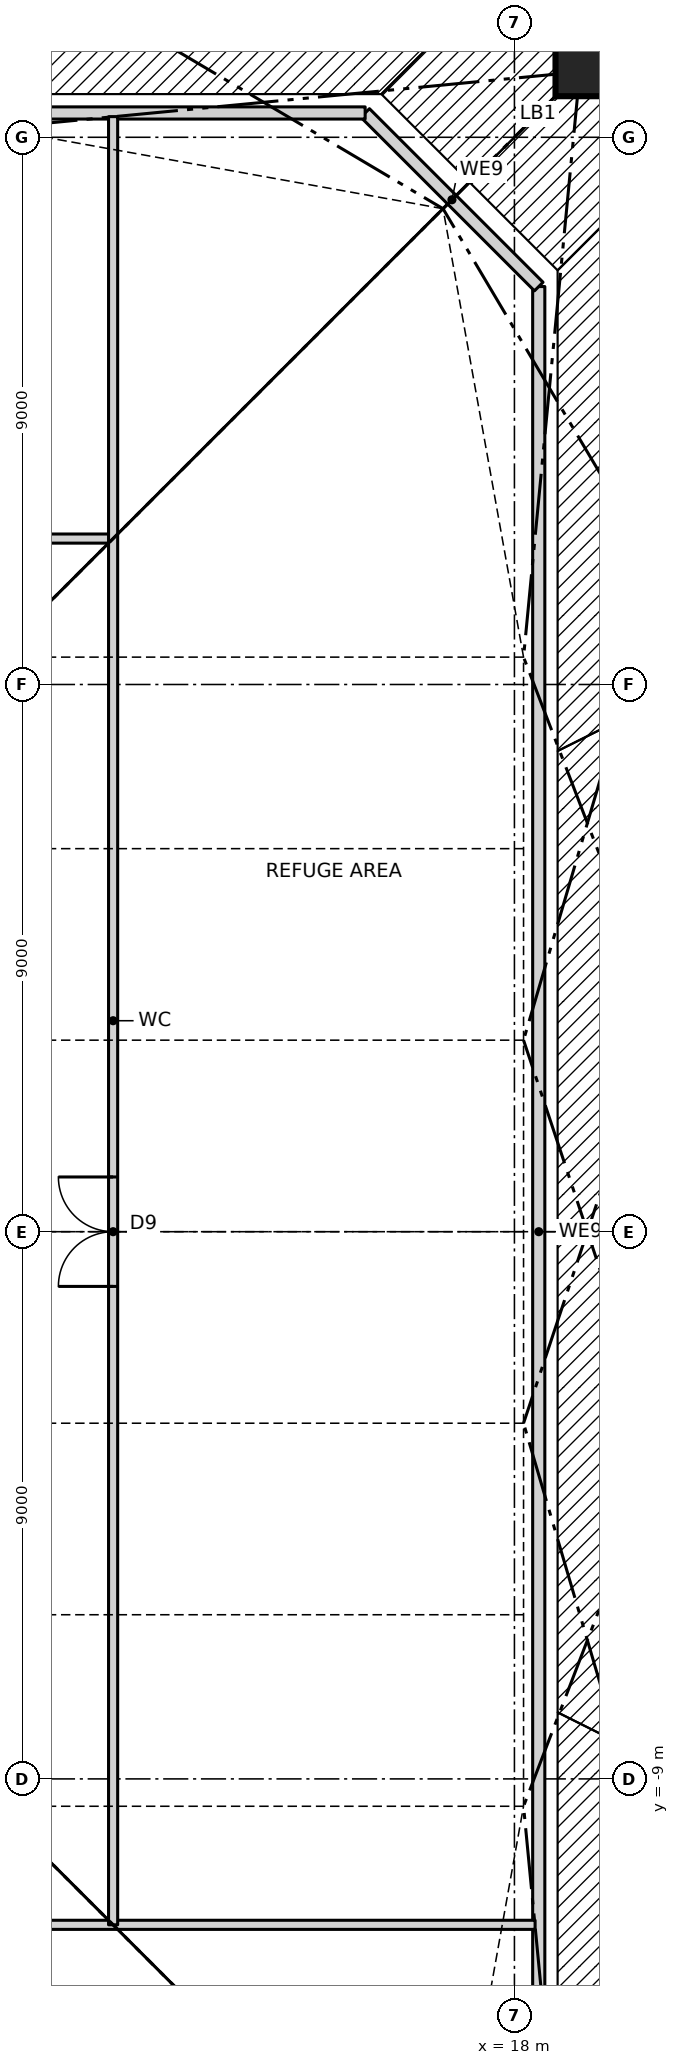
"""IFC4 building model, lengths in metres.
Left out: names, types, materials, properties, quantities, classifications, styles, units other than length and angle.
Written with IfcOpenShell. Run it as: python <this file> out.ifc"""

import sys

from ifc_helpers import new_model, si_unit, direction, frame, frame_2d, origin, origin_2d, place, context, subcontext, project, spatial, rectangle, hollow_rectangle, extrude, clip, halfspace, element, fill, save


model = new_model("IFC4")
c1 = context("Model", 3, precision=1e-05, world=origin(), true_north=direction((0.0, 1.0)))
c2 = subcontext(c1, "Body", "Model", "MODEL_VIEW")
j1 = project(units=[si_unit("LENGTHUNIT", "METRE"), si_unit("PLANEANGLEUNIT", "RADIAN")], contexts=[c1])
p1 = place(None, origin())
s1 = spatial("IfcSite", under=j1, at=p1, CompositionType="ELEMENT")
p2 = place(p1, origin())
s2 = spatial("IfcBuilding", under=s1, at=p2, CompositionType="ELEMENT")
p3 = place(p2, frame((0.0, 0.0, 143.5)))
s3 = spatial("IfcBuildingStorey", under=s2, at=p3, CompositionType="ELEMENT", Elevation=143.5)
p4 = place(p3, frame((20.4, -10.8, 0.0), z_axis=(-0.343580475001, 0.206163197348, 0.916214600002), x_axis=(-0.514523120505, -0.857476506072, 0.0)))
e1 = element("IfcColumn", 1, at=p4, inside=s3, PredefinedType="COLUMN", context=c2, shape_type="Clipping", body=[
    clip(clip(extrude(hollow_rectangle(XDim=0.8, YDim=0.8, WallThickness=0.07, at=origin_2d()), origin(), (0.0, 0.0, 1.0), 6.549), halfspace(frame((0.0, 0.0, 0.0), z_axis=(0.0, -0.400687916891, -0.916214600002), x_axis=(-0.514523120505, 0.785632494022, -0.343580475001)), False)), halfspace(frame((0.0, 2.404, 5.497), z_axis=(0.0, 0.400687916891, 0.916214600002), x_axis=(-0.514523120505, 0.785632494022, -0.343580475001)), False)),
])
p5 = place(p3, frame((20.4, -3.6, 0.0), z_axis=(-0.350260100688, 0.07008242466, 0.934026935168), x_axis=(-0.196197979098, -0.980564303347, 0.0)))
e2 = element("IfcColumn", 2, at=p5, inside=s3, PredefinedType="COLUMN", context=c2, shape_type="Clipping", body=[
    clip(clip(extrude(hollow_rectangle(XDim=0.8, YDim=0.8, WallThickness=0.07, at=origin_2d()), origin(), (0.0, 0.0, 1.0), 6.424), halfspace(frame((0.0, 0.0, 0.0), z_axis=(0.0, -0.35720258171, -0.934026935168), x_axis=(-0.196197979098, 0.91587347099, -0.350260100688)), False)), halfspace(frame((0.0, 2.143, 5.604), z_axis=(0.0, 0.35720258171, 0.934026935168), x_axis=(-0.196197979098, 0.91587347099, -0.350260100688)), False)),
])
p6 = place(p3, frame((20.4, 3.6, 0.0), z_axis=(-0.350260100688, -0.07008242466, 0.934026935168), x_axis=(0.196197979098, -0.980564303347, 0.0)))
e3 = element("IfcColumn", 3, at=p6, inside=s3, PredefinedType="COLUMN", context=c2, shape_type="Clipping", body=[
    clip(clip(extrude(hollow_rectangle(XDim=0.8, YDim=0.8, WallThickness=0.07, at=origin_2d()), origin(), (0.0, 0.0, 1.0), 6.424), halfspace(frame((0.0, 0.0, 0.0), z_axis=(0.0, -0.35720258171, -0.934026935168), x_axis=(0.196197979098, 0.91587347099, -0.350260100688)), False)), halfspace(frame((0.0, 2.143, 5.604), z_axis=(0.0, 0.35720258171, 0.934026935168), x_axis=(0.196197979098, 0.91587347099, -0.350260100688)), False)),
])
p7 = place(p3, frame((20.4, 10.8, 0.0), z_axis=(-0.343580475001, -0.206163197348, 0.916214600002), x_axis=(0.514523120505, -0.857476506072, 0.0)))
e4 = element("IfcColumn", 4, at=p7, inside=s3, PredefinedType="COLUMN", context=c2, shape_type="Clipping", body=[
    clip(clip(extrude(hollow_rectangle(XDim=0.8, YDim=0.8, WallThickness=0.07, at=origin_2d()), origin(), (0.0, 0.0, 1.0), 6.549), halfspace(frame((0.0, 0.0, 0.0), z_axis=(0.0, -0.400687916891, -0.916214600002), x_axis=(0.514523120505, 0.785632494022, -0.343580475001)), False)), halfspace(frame((0.0, 2.404, 5.497), z_axis=(0.0, 0.400687916891, 0.916214600002), x_axis=(0.514523120505, 0.785632494022, -0.343580475001)), False)),
])
p8 = place(p3, frame((19.076, 19.076, 0.0), z_axis=(-0.331294578225, -0.331294578225, 0.883452208599), x_axis=(0.707106781187, -0.707106781187, 0.0)))
e5 = element("IfcColumn", 5, at=p8, inside=s3, PredefinedType="COLUMN", context=c2, shape_type="Clipping", body=[
    clip(clip(extrude(hollow_rectangle(XDim=0.8, YDim=0.8, WallThickness=0.18, at=origin_2d()), origin(), (0.0, 0.0, 1.0), 6.792), halfspace(frame((0.0, 0.0, 0.0), z_axis=(0.0, -0.468521285666, -0.883452208599), x_axis=(0.707106781187, 0.624695047554, -0.331294578225)), False)), halfspace(frame((0.0, 2.811, 5.301), z_axis=(0.0, 0.468521285666, 0.883452208599), x_axis=(0.707106781187, 0.624695047554, -0.331294578225)), False)),
])
p9 = place(p3, frame((10.8, 20.4, 0.0), z_axis=(-0.206163197348, -0.343580475001, 0.916214600002), x_axis=(0.857476506072, -0.514523120505, 0.0)))
e6 = element("IfcColumn", 6, at=p9, inside=s3, PredefinedType="COLUMN", context=c2, shape_type="Clipping", body=[
    clip(clip(extrude(hollow_rectangle(XDim=0.8, YDim=0.8, WallThickness=0.07, at=origin_2d()), origin(), (0.0, 0.0, 1.0), 6.549), halfspace(frame((0.0, 0.0, 0.0), z_axis=(0.0, -0.400687916891, -0.916214600002), x_axis=(0.857476506072, 0.471413595046, -0.206163197348)), False)), halfspace(frame((0.0, 2.404, 5.497), z_axis=(0.0, 0.400687916891, 0.916214600002), x_axis=(0.857476506072, 0.471413595046, -0.206163197348)), False)),
])
p10 = place(p3, frame((18.4, -15.545, 0.0), z_axis=(0.0, 0.0, 1.0), x_axis=(0.0, 1.0, 0.0)))
e7 = element("IfcWall", 7, at=p10, inside=s3, PredefinedType="PARTITIONING", context=c2, shape_type="SweptSolid", body=[
    extrude(rectangle(XDim=31.09, YDim=0.2, at=frame_2d((15.545, 0.0))), origin(), (0.0, 0.0, 1.0), 5.7),
])
p11 = place(p3, frame((18.4, 15.545, 0.0), z_axis=(0.0, 0.0, 1.0), x_axis=(-0.707106781187, 0.707106781187, 0.0)))
e8 = element("IfcWall", 8, at=p11, inside=s3, PredefinedType="PARTITIONING", context=c2, shape_type="SweptSolid", body=[
    extrude(rectangle(XDim=4.038, YDim=0.2, at=frame_2d((2.019, 0.0))), origin(), (0.0, 0.0, 1.0), 5.7),
])
p12 = place(p3, frame((15.545, 18.4, 0.0), z_axis=(0.0, 0.0, 1.0), x_axis=(-1.0, 0.0, 0.0)))
e9 = element("IfcWall", 9, at=p12, inside=s3, PredefinedType="PARTITIONING", context=c2, shape_type="SweptSolid", body=[
    extrude(rectangle(XDim=31.09, YDim=0.2, at=frame_2d((15.545, 0.0))), origin(), (0.0, 0.0, 1.0), 5.7),
])
p13 = place(p3, frame((-11.4, -11.4, 0.0), z_axis=(0.0, 0.0, 1.0), x_axis=(1.0, 0.0, 0.0)))
e10 = element("IfcWall", 10, at=p13, inside=s3, PredefinedType="PARTITIONING", context=c2, shape_type="SweptSolid", body=[
    extrude(rectangle(XDim=29.74, YDim=0.15, at=frame_2d((14.87, 0.0))), origin(), (0.0, 0.0, 1.0), 5.77),
])
p14 = place(p13, frame((4.1, 0.0, 0.0)))
e11 = element("IfcOpeningElement", 11, at=p14, cuts=e10, PredefinedType="OPENING", context=c2, shape_type="SweptSolid", body=[
    extrude(rectangle(XDim=1.8, YDim=2.1, at=frame_2d((0.9, 1.05))), frame((0.0, 0.085, 0.0), z_axis=(0.0, -1.0, 0.0), x_axis=(1.0, 0.0, 0.0)), (0.0, 0.0, 1.0), 0.17),
])
p15 = place(p13, frame((12.6, 0.0, 0.0)))
e12 = element("IfcOpeningElement", 12, at=p15, cuts=e10, PredefinedType="OPENING", context=c2, shape_type="SweptSolid", body=[
    extrude(rectangle(XDim=1.8, YDim=2.1, at=frame_2d((0.9, 1.05))), frame((0.0, 0.085, 0.0), z_axis=(0.0, -1.0, 0.0), x_axis=(1.0, 0.0, 0.0)), (0.0, 0.0, 1.0), 0.17),
])
p16 = place(p13, frame((19.0, 0.0, 0.0)))
e13 = element("IfcOpeningElement", 13, at=p16, cuts=e10, PredefinedType="OPENING", context=c2, shape_type="SweptSolid", body=[
    extrude(rectangle(XDim=1.8, YDim=2.1, at=frame_2d((0.9, 1.05))), frame((0.0, 0.085, 0.0), z_axis=(0.0, -1.0, 0.0), x_axis=(1.0, 0.0, 0.0)), (0.0, 0.0, 1.0), 0.17),
])
p17 = place(p3, frame((-18.34, 11.4, 0.0), z_axis=(0.0, 0.0, 1.0), x_axis=(1.0, 0.0, 0.0)))
e14 = element("IfcWall", 14, at=p17, inside=s3, PredefinedType="PARTITIONING", context=c2, shape_type="SweptSolid", body=[
    extrude(rectangle(XDim=29.74, YDim=0.15, at=frame_2d((14.87, 0.0))), origin(), (0.0, 0.0, 1.0), 5.77),
])
p18 = place(p17, frame((25.34, 0.0, 0.0)))
e15 = element("IfcOpeningElement", 15, at=p18, cuts=e14, PredefinedType="OPENING", context=c2, shape_type="SweptSolid", body=[
    extrude(rectangle(XDim=1.8, YDim=2.1, at=frame_2d((0.9, 1.05))), frame((0.0, 0.085, 0.0), z_axis=(0.0, -1.0, 0.0), x_axis=(1.0, 0.0, 0.0)), (0.0, 0.0, 1.0), 0.17),
])
p19 = place(p17, frame((17.84, 0.0, 0.0)))
e16 = element("IfcOpeningElement", 16, at=p19, cuts=e14, PredefinedType="OPENING", context=c2, shape_type="SweptSolid", body=[
    extrude(rectangle(XDim=1.8, YDim=2.1, at=frame_2d((0.9, 1.05))), frame((0.0, 0.085, 0.0), z_axis=(0.0, -1.0, 0.0), x_axis=(1.0, 0.0, 0.0)), (0.0, 0.0, 1.0), 0.17),
])
p20 = place(p17, frame((9.94, 0.0, 0.0)))
e17 = element("IfcOpeningElement", 17, at=p20, cuts=e14, PredefinedType="OPENING", context=c2, shape_type="SweptSolid", body=[
    extrude(rectangle(XDim=1.8, YDim=2.1, at=frame_2d((0.9, 1.05))), frame((0.0, 0.085, 0.0), z_axis=(0.0, -1.0, 0.0), x_axis=(1.0, 0.0, 0.0)), (0.0, 0.0, 1.0), 0.17),
])
p21 = place(p3, frame((11.4, -11.4, 0.0), z_axis=(0.0, 0.0, 1.0), x_axis=(0.0, 1.0, 0.0)))
e18 = element("IfcWall", 18, at=p21, inside=s3, PredefinedType="PARTITIONING", context=c2, shape_type="SweptSolid", body=[
    extrude(rectangle(XDim=29.74, YDim=0.15, at=frame_2d((14.87, 0.0))), origin(), (0.0, 0.0, 1.0), 5.77),
])
p22 = place(p21, frame((10.5, 0.0, 0.0)))
e19 = element("IfcOpeningElement", 19, at=p22, cuts=e18, PredefinedType="OPENING", context=c2, shape_type="SweptSolid", body=[
    extrude(rectangle(XDim=1.8, YDim=2.1, at=frame_2d((0.9, 1.05))), frame((0.0, 0.085, 0.0), z_axis=(0.0, -1.0, 0.0), x_axis=(1.0, 0.0, 0.0)), (0.0, 0.0, 1.0), 0.17),
])
p23 = place(p22, origin())
e20 = element("IfcDoor", 20, at=p23, inside=s3, OperationType="DOUBLE_DOOR_SINGLE_SWING", PredefinedType="DOOR", context=c2, shape_type="SweptSolid", body=[
    extrude(rectangle(XDim=1.8, YDim=2.1, at=frame_2d((0.9, 1.05))), frame((0.0, 0.025, 0.0), z_axis=(0.0, -1.0, 0.0), x_axis=(1.0, 0.0, 0.0)), (0.0, 0.0, 1.0), 0.05),
])
fill(e19, e20)
save(model, sys.argv[1])
